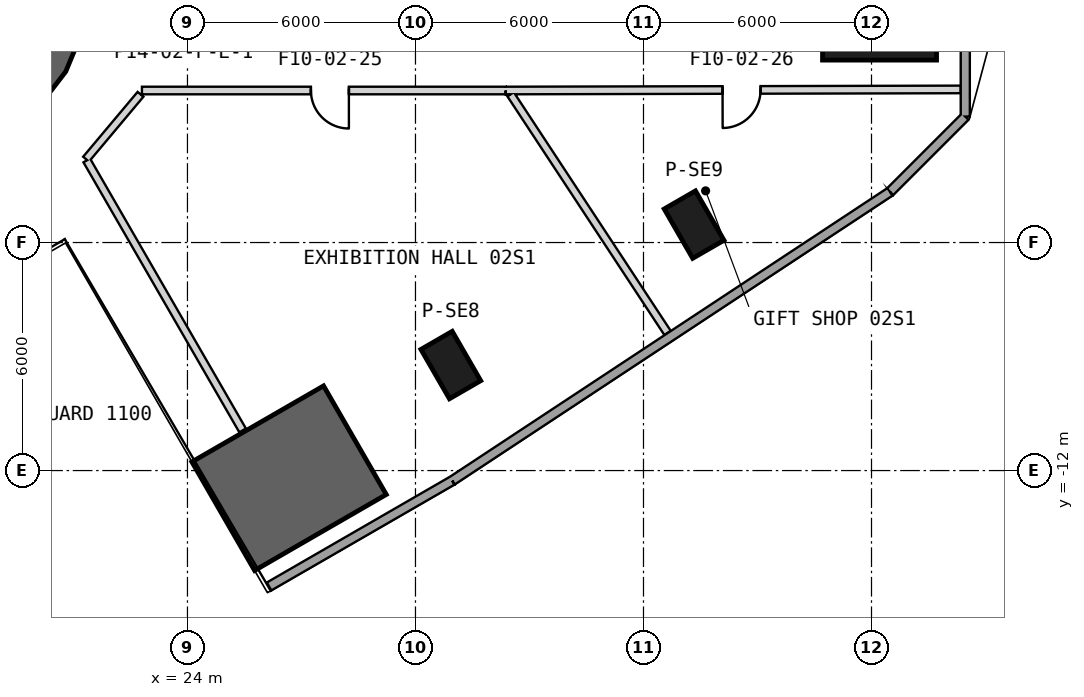
"""IFC4 building model, lengths in metres.
Left out: names, types, materials, properties, quantities, classifications, styles, units other than length and angle.
Written with IfcOpenShell. Run it as: python <this file> out.ifc"""

import sys

from ifc_helpers import new_model, si_unit, direction, frame, frame_2d, origin, origin_2d, place, context, subcontext, project, spatial, polyline, rectangle, outline, extrude, element, fill, save


model = new_model("IFC4")
c1 = context("Model", 3, precision=1e-05, world=origin(), true_north=direction((0.0, 1.0)))
c2 = subcontext(c1, "Body", "Model", "MODEL_VIEW")
j1 = project(units=[si_unit("LENGTHUNIT", "METRE"), si_unit("PLANEANGLEUNIT", "RADIAN")], contexts=[c1])
p1 = place(None, origin())
s1 = spatial("IfcSite", under=j1, at=p1, CompositionType="ELEMENT")
p2 = place(p1, origin())
s2 = spatial("IfcBuilding", under=s1, at=p2, CompositionType="ELEMENT")
p3 = place(p2, frame((0.0, 0.0, 15.5)))
s3 = spatial("IfcBuildingStorey", under=s2, at=p3, CompositionType="ELEMENT", Elevation=15.5)
p4 = place(p3, frame((42.211, 0.0, 0.0), z_axis=(0.0, 0.0, 1.0), x_axis=(1.0, 0.0, 0.0)))
e1 = element("IfcColumn", 1, at=p4, inside=s3, PredefinedType="COLUMN", context=c2, shape_type="SweptSolid", body=[
    extrude(rectangle(XDim=3.0, YDim=2.4, at=origin_2d()), origin(), (0.0, 0.0, 1.0), 6.0),
])
for number, where, z_axis, x_axis in (
    (2, (30.93, -9.224, 0.0), (0.0, 0.0, 1.0), (0.5, -0.866, 0.0)),
    (3, (37.331, -5.528, 0.0), (0.0, 0.0, 1.0), (0.5, -0.866, 0.0)),
):
    element("IfcColumn", number, at=place(p3, frame(where, z_axis=z_axis, x_axis=x_axis)), inside=s3, PredefinedType="COLUMN", context=c2, shape_type="SweptSolid", body=[
        extrude(rectangle(XDim=1.5, YDim=0.95, at=origin_2d()), origin(), (0.0, 0.0, 1.0), 6.0),
    ])
p5 = place(p3, origin())
e4 = element("IfcWall", 4, at=p5, inside=s3, PredefinedType="SHEAR", context=c2, shape_type="SweptSolid", body=[
    extrude(outline(polyline([(19.7, -2.598), (20.321, -2.121), (20.798, -1.5), (21.098, -0.777), (21.2, 0.0), (21.098, 0.777), (20.798, 1.5), (20.321, 2.121), (19.7, 2.598), (19.25, 1.819), (19.685, 1.485), (20.019, 1.05), (20.229, 0.543), (20.3, 0.0), (20.229, -0.543), (20.019, -1.05), (19.685, -1.485), (19.25, -1.819), (19.7, -2.598)])), origin(), (0.0, 0.0, 1.0), 6.0),
])
p6 = place(p3, origin())
e5 = element("IfcWall", 5, at=p6, inside=s3, PredefinedType="SHEAR", context=c2, shape_type="SweptSolid", body=[
    extrude(outline(polyline([(25.767, -14.63), (29.231, -12.63), (27.581, -9.772), (24.117, -11.772), (25.767, -14.63)])), origin(), (0.0, 0.0, 1.0), 6.0),
])
p7 = place(p3, frame((26.147, -15.05, 0.0), z_axis=(0.0, 0.0, 1.0), x_axis=(0.865999312459, 0.500045188778, 0.0)))
e6 = element("IfcWall", 6, at=p7, inside=s3, PredefinedType="SOLIDWALL", context=c2, shape_type="SweptSolid", body=[
    extrude(rectangle(XDim=5.566, YDim=0.24, at=frame_2d((2.783, 0.0))), origin(), (0.0, 0.0, 1.0), 5.7),
])
p8 = place(p3, frame((30.968, -12.267, 0.0), z_axis=(0.0, 0.0, 1.0), x_axis=(0.834683405501, 0.550730072342, 0.0)))
e7 = element("IfcWall", 7, at=p8, inside=s3, PredefinedType="SOLIDWALL", context=c2, shape_type="SweptSolid", body=[
    extrude(rectangle(XDim=13.801, YDim=0.24, at=frame_2d((6.901, 0.0))), origin(), (0.0, 0.0, 1.0), 5.7),
])
p9 = place(p3, frame((42.487, -4.666, 0.0), z_axis=(0.0, 0.0, 1.0), x_axis=(0.707106781187, 0.707106781187, 0.0)))
e8 = element("IfcWall", 8, at=p9, inside=s3, PredefinedType="SOLIDWALL", context=c2, shape_type="SweptSolid", body=[
    extrude(rectangle(XDim=2.801, YDim=0.24, at=frame_2d((1.4, 0.0))), origin(), (0.0, 0.0, 1.0), 5.7),
])
p10 = place(p3, frame((44.468, -2.686, 0.0), z_axis=(0.0, 0.0, 1.0), x_axis=(0.0, 1.0, 0.0)))
e9 = element("IfcWall", 9, at=p10, inside=s3, PredefinedType="SOLIDWALL", context=c2, shape_type="SweptSolid", body=[
    extrude(rectangle(XDim=5.371, YDim=0.24, at=frame_2d((2.686, 0.0))), origin(), (0.0, 0.0, 1.0), 5.7),
])
p11 = place(p3, frame((32.375, -2.0, 0.0), z_axis=(0.0, 0.0, 1.0), x_axis=(-1.0, 0.0, 0.0)))
e10 = element("IfcWall", 10, at=p11, inside=s3, PredefinedType="PARTITIONING", context=c2, shape_type="SweptSolid", body=[
    extrude(rectangle(XDim=9.573, YDim=0.2, at=frame_2d((4.786, 0.0))), origin(), (0.0, 0.0, 1.0), 5.7),
])
p12 = place(p11, frame((4.127, 0.0, 0.0)))
e11 = element("IfcOpeningElement", 11, at=p12, cuts=e10, PredefinedType="OPENING", context=c2, shape_type="SweptSolid", body=[
    extrude(rectangle(XDim=1.0, YDim=2.1, at=frame_2d((0.5, 1.05))), frame((0.0, 0.11, 0.0), z_axis=(0.0, -1.0, 0.0), x_axis=(1.0, 0.0, 0.0)), (0.0, 0.0, 1.0), 0.22),
])
p13 = place(p3, frame((21.332, -3.807, 0.0), z_axis=(0.0, 0.0, 1.0), x_axis=(0.642927476008, 0.765927059578, 0.0)))
e12 = element("IfcWall", 12, at=p13, inside=s3, PredefinedType="PARTITIONING", context=c2, shape_type="SweptSolid", body=[
    extrude(rectangle(XDim=2.229, YDim=0.2, at=frame_2d((1.115, 0.0))), origin(), (0.0, 0.0, 1.0), 4.78),
])
p14 = place(p3, frame((25.452, -10.944, 0.0), z_axis=(0.0, 0.0, 1.0), x_axis=(-0.499992958048, 0.866029469419, 0.0)))
e13 = element("IfcWall", 13, at=p14, inside=s3, PredefinedType="PARTITIONING", context=c2, shape_type="SweptSolid", body=[
    extrude(rectangle(XDim=8.203, YDim=0.2, at=frame_2d((4.102, 0.0))), origin(), (0.0, 0.0, 1.0), 5.07),
])
p15 = place(p3, frame((44.347, -1.971, 0.0), z_axis=(0.0, 0.0, 1.0), x_axis=(-0.999997105116, -0.002406192056, 0.0)))
e14 = element("IfcWall", 14, at=p15, inside=s3, PredefinedType="PARTITIONING", context=c2, shape_type="SweptSolid", body=[
    extrude(rectangle(XDim=11.973, YDim=0.2, at=frame_2d((5.986, 0.0))), origin(), (0.0, 0.0, 1.0), 5.7),
])
p16 = place(p15, frame((5.267, 0.0, 0.0)))
e15 = element("IfcOpeningElement", 15, at=p16, cuts=e14, PredefinedType="OPENING", context=c2, shape_type="SweptSolid", body=[
    extrude(rectangle(XDim=1.0, YDim=2.1, at=frame_2d((0.5, 1.05))), frame((0.0, 0.11, 0.0), z_axis=(0.0, -1.0, 0.0), x_axis=(1.0, 0.0, 0.0)), (0.0, 0.0, 1.0), 0.22),
])
p17 = place(p3, frame((36.634, -8.378, 0.0), z_axis=(0.0, 0.0, 1.0), x_axis=(-0.549584280898, 0.835438279102, 0.0)))
e16 = element("IfcWall", 16, at=p17, inside=s3, PredefinedType="PARTITIONING", context=c2, shape_type="SweptSolid", body=[
    extrude(rectangle(XDim=7.515, YDim=0.2, at=frame_2d((3.757, 0.0))), origin(), (0.0, 0.0, 1.0), 4.78),
])
p18 = place(p12, origin())
e17 = element("IfcDoor", 17, at=p18, inside=s3, OperationType="SINGLE_SWING_LEFT", PredefinedType="USERDEFINED", context=c2, shape_type="SweptSolid", body=[
    extrude(rectangle(XDim=1.0, YDim=2.1, at=frame_2d((0.5, 1.05))), frame((0.0, 0.025, 0.0), z_axis=(0.0, -1.0, 0.0), x_axis=(1.0, 0.0, 0.0)), (0.0, 0.0, 1.0), 0.05),
])
fill(e11, e17)
p19 = place(p16, origin())
e18 = element("IfcDoor", 18, at=p19, inside=s3, OperationType="SINGLE_SWING_RIGHT", PredefinedType="USERDEFINED", context=c2, shape_type="SweptSolid", body=[
    extrude(rectangle(XDim=1.0, YDim=2.1, at=frame_2d((0.5, 1.05))), frame((0.0, 0.025, 0.0), z_axis=(0.0, -1.0, 0.0), x_axis=(1.0, 0.0, 0.0)), (0.0, 0.0, 1.0), 0.05),
])
fill(e15, e18)
save(model, sys.argv[1])
